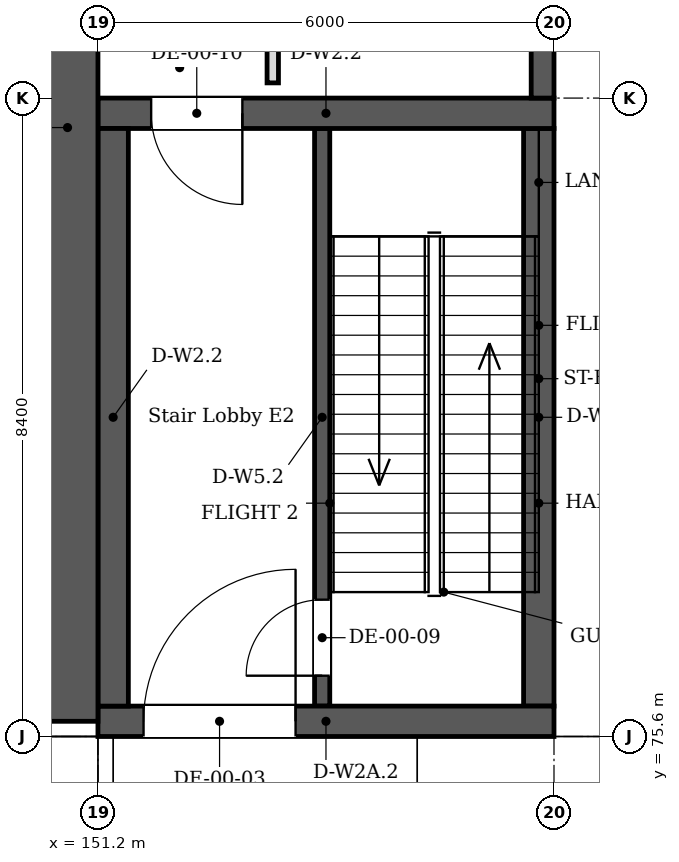
"""IFC4 building model, lengths in metres.
Left out: names, types, materials, properties, quantities, classifications, styles, units other than length and angle.
Written with IfcOpenShell. Run it as: python <this file> out.ifc"""

import sys

from ifc_helpers import new_model, si_unit, direction, frame, frame_2d, origin, place, context, subcontext, project, spatial, rectangle, extrude, element, fill, save


model = new_model("IFC4")
c1 = context("Model", 3, precision=1e-05, world=origin(), true_north=direction((0.0, 1.0)))
c2 = subcontext(c1, "Body", "Model", "MODEL_VIEW")
j1 = project(units=[si_unit("LENGTHUNIT", "METRE"), si_unit("PLANEANGLEUNIT", "RADIAN")], contexts=[c1])
p1 = place(None, origin())
s1 = spatial("IfcSite", under=j1, at=p1, CompositionType="ELEMENT")
p2 = place(p1, origin())
s2 = spatial("IfcBuilding", under=s1, at=p2, CompositionType="ELEMENT")
p3 = place(p2, origin())
s3 = spatial("IfcBuildingStorey", under=s2, at=p3, CompositionType="ELEMENT", Elevation=0.0)
p4 = place(p3, frame((150.8, 75.8, 0.0), z_axis=(0.0, 0.0, 1.0), x_axis=(0.0, 1.0, 0.0)))
e1 = element("IfcWall", 1, at=p4, inside=s3, PredefinedType="SOLIDWALL", context=c2, shape_type="SweptSolid", body=[
    extrude(rectangle(XDim=25.0, YDim=0.8, at=frame_2d((12.5, 0.0))), origin(), (0.0, 0.0, 1.0), 5.963),
])
p5 = place(p4, frame((9.0, 0.0, 3.8)))
e2 = element("IfcOpeningElement", 2, at=p5, cuts=e1, PredefinedType="OPENING", context=c2, shape_type="SweptSolid", body=[
    extrude(rectangle(XDim=2.4, YDim=1.2, at=frame_2d((1.2, 0.6))), frame((0.0, 0.41, 0.0), z_axis=(0.0, -1.0, 0.0), x_axis=(1.0, 0.0, 0.0)), (0.0, 0.0, 1.0), 0.82),
])
p6 = place(p4, frame((17.0, 0.0, 3.8)))
e3 = element("IfcOpeningElement", 3, at=p6, cuts=e1, PredefinedType="OPENING", context=c2, shape_type="SweptSolid", body=[
    extrude(rectangle(XDim=2.4, YDim=1.2, at=frame_2d((1.2, 0.6))), frame((0.0, 0.41, 0.0), z_axis=(0.0, -1.0, 0.0), x_axis=(1.0, 0.0, 0.0)), (0.0, 0.0, 1.0), 0.82),
])
p7 = place(p4, frame((11.5, 0.0, 0.0)))
e4 = element("IfcOpeningElement", 4, at=p7, cuts=e1, PredefinedType="OPENING", context=c2, shape_type="SweptSolid", body=[
    extrude(rectangle(XDim=1.4, YDim=2.4, at=frame_2d((0.7, 1.2))), frame((0.0, 0.41, 0.0), z_axis=(0.0, -1.0, 0.0), x_axis=(1.0, 0.0, 0.0)), (0.0, 0.0, 1.0), 0.82),
])
p8 = place(p4, frame((19.5, 0.0, 0.0)))
e5 = element("IfcOpeningElement", 5, at=p8, cuts=e1, PredefinedType="OPENING", context=c2, shape_type="SweptSolid", body=[
    extrude(rectangle(XDim=1.4, YDim=2.4, at=frame_2d((0.7, 1.2))), frame((0.0, 0.41, 0.0), z_axis=(0.0, -1.0, 0.0), x_axis=(1.0, 0.0, 0.0)), (0.0, 0.0, 1.0), 0.82),
])
p9 = place(p3, frame((157.2, 75.8, 0.0), z_axis=(0.0, 0.0, 1.0), x_axis=(-1.0, 0.0, 0.0)))
e6 = element("IfcWall", 6, at=p9, inside=s3, PredefinedType="SOLIDWALL", context=c2, shape_type="SweptSolid", body=[
    extrude(rectangle(XDim=6.0, YDim=0.4, at=frame_2d((3.0, 0.0))), origin(), (0.0, 0.0, 1.0), 5.72),
])
p10 = place(p9, frame((3.4, 0.0, 0.0)))
e7 = element("IfcOpeningElement", 7, at=p10, cuts=e6, PredefinedType="OPENING", context=c2, shape_type="SweptSolid", body=[
    extrude(rectangle(XDim=2.0, YDim=2.4, at=frame_2d((1.0, 1.2))), frame((0.0, 0.21, 0.0), z_axis=(0.0, -1.0, 0.0), x_axis=(1.0, 0.0, 0.0)), (0.0, 0.0, 1.0), 0.42),
])
p11 = place(p3, frame((151.2, 83.8, 0.0), z_axis=(0.0, 0.0, 1.0), x_axis=(1.0, 0.0, 0.0)))
e8 = element("IfcWall", 8, at=p11, inside=s3, PredefinedType="SOLIDWALL", context=c2, shape_type="SweptSolid", body=[
    extrude(rectangle(XDim=6.0, YDim=0.4, at=frame_2d((3.0, 0.0))), origin(), (0.0, 0.0, 1.0), 5.72),
])
p12 = place(p11, frame((0.7, 0.0, 0.0)))
e9 = element("IfcOpeningElement", 9, at=p12, cuts=e8, PredefinedType="OPENING", context=c2, shape_type="SweptSolid", body=[
    extrude(rectangle(XDim=1.2, YDim=2.1, at=frame_2d((0.6, 1.05))), frame((0.0, 0.21, 0.0), z_axis=(0.0, -1.0, 0.0), x_axis=(1.0, 0.0, 0.0)), (0.0, 0.0, 1.0), 0.42),
])
for number, where, z_axis, x_axis in (
    (10, (151.4, 76.0, 0.0), (0.0, 0.0, 1.0), (0.0, 1.0, 0.0)),
    (11, (157.0, 76.0, 0.0), (0.0, 0.0, 1.0), (0.0, 1.0, 0.0)),
):
    element("IfcWall", number, at=place(p3, frame(where, z_axis=z_axis, x_axis=x_axis)), inside=s3, PredefinedType="SOLIDWALL", context=c2, shape_type="SweptSolid", body=[
        extrude(rectangle(XDim=7.6, YDim=0.4, at=frame_2d((3.8, 0.0))), origin(), (0.0, 0.0, 1.0), 5.72),
    ])
p13 = place(p3, frame((154.15, 76.0, 0.0), z_axis=(0.0, 0.0, 1.0), x_axis=(0.0, 1.0, 0.0)))
e12 = element("IfcWall", 12, at=p13, inside=s3, PredefinedType="SOLIDWALL", context=c2, shape_type="SweptSolid", body=[
    extrude(rectangle(XDim=7.6, YDim=0.2, at=frame_2d((3.8, 0.0))), origin(), (0.0, 0.0, 1.0), 5.72),
])
p14 = place(p13, frame((0.4, 0.0, 0.0)))
e13 = element("IfcOpeningElement", 13, at=p14, cuts=e12, PredefinedType="OPENING", context=c2, shape_type="SweptSolid", body=[
    extrude(rectangle(XDim=1.0, YDim=2.1, at=frame_2d((0.5, 1.05))), frame((0.0, 0.11, 0.0), z_axis=(0.0, -1.0, 0.0), x_axis=(1.0, 0.0, 0.0)), (0.0, 0.0, 1.0), 0.22),
])
p15 = place(p3, frame((157.05, 84.0, 0.0), z_axis=(0.0, 0.0, 1.0), x_axis=(0.0, 1.0, 0.0)))
e14 = element("IfcWall", 14, at=p15, inside=s3, PredefinedType="SOLIDWALL", context=c2, shape_type="SweptSolid", body=[
    extrude(rectangle(XDim=24.9, YDim=0.3, at=frame_2d((12.45, 0.0))), origin(), (0.0, 0.0, 1.0), 5.72),
])
p16 = place(p15, frame((3.1, 0.0, 1.5)))
e15 = element("IfcOpeningElement", 15, at=p16, cuts=e14, PredefinedType="OPENING", context=c2, shape_type="SweptSolid", body=[
    extrude(rectangle(XDim=1.8, YDim=1.2, at=frame_2d((0.9, 0.6))), frame((0.0, 0.16, 0.0), z_axis=(0.0, -1.0, 0.0), x_axis=(1.0, 0.0, 0.0)), (0.0, 0.0, 1.0), 0.32),
])
p17 = place(p15, frame((11.1, 0.0, 1.5)))
e16 = element("IfcOpeningElement", 16, at=p17, cuts=e14, PredefinedType="OPENING", context=c2, shape_type="SweptSolid", body=[
    extrude(rectangle(XDim=1.8, YDim=1.2, at=frame_2d((0.9, 0.6))), frame((0.0, 0.16, 0.0), z_axis=(0.0, -1.0, 0.0), x_axis=(1.0, 0.0, 0.0)), (0.0, 0.0, 1.0), 0.32),
])
p18 = place(p3, frame((153.5, 84.2, 0.0), z_axis=(0.0, 0.0, 1.0), x_axis=(0.0, 1.0, 0.0)))
e17 = element("IfcWall", 17, at=p18, inside=s3, PredefinedType="PARTITIONING", context=c2, shape_type="SweptSolid", body=[
    extrude(rectangle(XDim=24.7, YDim=0.15, at=frame_2d((12.35, 0.0))), origin(), (0.0, 0.0, 1.0), 5.72),
])
p19 = place(p18, frame((3.25, 0.0, 0.0)))
e18 = element("IfcOpeningElement", 18, at=p19, cuts=e17, PredefinedType="OPENING", context=c2, shape_type="SweptSolid", body=[
    extrude(rectangle(XDim=1.1, YDim=2.4, at=frame_2d((0.55, 1.2))), frame((0.0, 0.085, 0.0), z_axis=(0.0, -1.0, 0.0), x_axis=(1.0, 0.0, 0.0)), (0.0, 0.0, 1.0), 0.17),
])
p20 = place(p18, frame((11.25, 0.0, 0.0)))
e19 = element("IfcOpeningElement", 19, at=p20, cuts=e17, PredefinedType="OPENING", context=c2, shape_type="SweptSolid", body=[
    extrude(rectangle(XDim=1.1, YDim=2.4, at=frame_2d((0.55, 1.2))), frame((0.0, 0.085, 0.0), z_axis=(0.0, -1.0, 0.0), x_axis=(1.0, 0.0, 0.0)), (0.0, 0.0, 1.0), 0.17),
])
p21 = place(p18, frame((17.5, 0.0, 0.0)))
e20 = element("IfcOpeningElement", 20, at=p21, cuts=e17, PredefinedType="OPENING", context=c2, shape_type="SweptSolid", body=[
    extrude(rectangle(XDim=1.0, YDim=2.1, at=frame_2d((0.5, 1.05))), frame((0.0, 0.085, 0.0), z_axis=(0.0, -1.0, 0.0), x_axis=(1.0, 0.0, 0.0)), (0.0, 0.0, 1.0), 0.17),
])
p22 = place(p18, frame((22.0, 0.0, 0.0)))
e21 = element("IfcOpeningElement", 21, at=p22, cuts=e17, PredefinedType="OPENING", context=c2, shape_type="SweptSolid", body=[
    extrude(rectangle(XDim=1.0, YDim=2.1, at=frame_2d((0.5, 1.05))), frame((0.0, 0.085, 0.0), z_axis=(0.0, -1.0, 0.0), x_axis=(1.0, 0.0, 0.0)), (0.0, 0.0, 1.0), 0.17),
])
p23 = place(p10, origin())
e22 = element("IfcDoor", 22, at=p23, inside=s3, OperationType="DOUBLE_DOOR_SINGLE_SWING", PredefinedType="DOOR", context=c2, shape_type="SweptSolid", body=[
    extrude(rectangle(XDim=2.0, YDim=2.4, at=frame_2d((1.0, 1.2))), frame((0.0, 0.025, 0.0), z_axis=(0.0, -1.0, 0.0), x_axis=(1.0, 0.0, 0.0)), (0.0, 0.0, 1.0), 0.05),
])
fill(e7, e22)
p24 = place(p14, origin())
e23 = element("IfcDoor", 23, at=p24, inside=s3, OperationType="SINGLE_SWING_LEFT", PredefinedType="DOOR", context=c2, shape_type="SweptSolid", body=[
    extrude(rectangle(XDim=1.0, YDim=2.1, at=frame_2d((0.5, 1.05))), frame((0.0, 0.025, 0.0), z_axis=(0.0, -1.0, 0.0), x_axis=(1.0, 0.0, 0.0)), (0.0, 0.0, 1.0), 0.05),
])
fill(e13, e23)
p25 = place(p12, origin())
e24 = element("IfcDoor", 24, at=p25, inside=s3, OperationType="SINGLE_SWING_LEFT", PredefinedType="DOOR", context=c2, shape_type="SweptSolid", body=[
    extrude(rectangle(XDim=1.2, YDim=2.1, at=frame_2d((0.6, 1.05))), frame((0.0, 0.025, 0.0), z_axis=(0.0, -1.0, 0.0), x_axis=(1.0, 0.0, 0.0)), (0.0, 0.0, 1.0), 0.05),
])
fill(e9, e24)
save(model, sys.argv[1])
